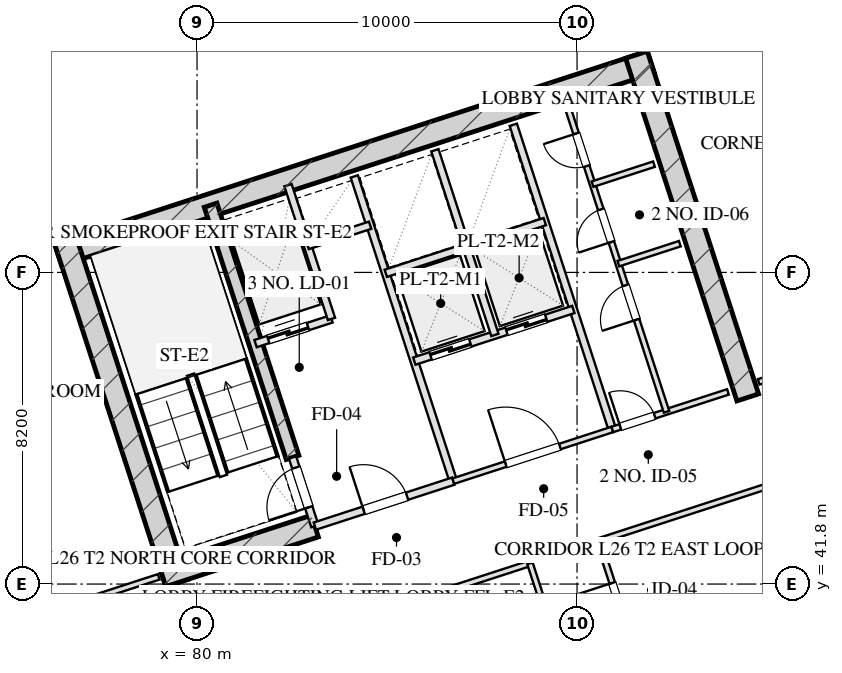
"""IFC4 building model, lengths in metres.
Left out: names, types, materials, properties, quantities, classifications, styles, units other than length and angle.
Written with IfcOpenShell. Run it as: python <this file> out.ifc"""

import sys

from ifc_helpers import new_model, si_unit, direction, frame, frame_2d, origin, place, context, subcontext, project, spatial, rectangle, extrude, element, fill, save


model = new_model("IFC4")
c1 = context("Model", 3, precision=1e-05, world=origin(), true_north=direction((0.0, 1.0)))
c2 = subcontext(c1, "Body", "Model", "MODEL_VIEW")
j1 = project(units=[si_unit("LENGTHUNIT", "METRE"), si_unit("PLANEANGLEUNIT", "RADIAN")], contexts=[c1])
p1 = place(None, origin())
s1 = spatial("IfcSite", under=j1, at=p1, CompositionType="ELEMENT")
p2 = place(p1, origin())
s2 = spatial("IfcBuilding", under=s1, at=p2, CompositionType="ELEMENT")
p3 = place(p2, frame((0.0, 0.0, 103.5)))
s3 = spatial("IfcBuildingStorey", under=s2, at=p3, CompositionType="ELEMENT", Elevation=103.5)
p4 = place(p3, frame((76.344, 50.466, 0.0), z_axis=(0.0, 0.0, 1.0), x_axis=(0.951055727519, 0.309019421968, 0.0)))
e1 = element("IfcWall", 1, at=p4, inside=s3, PredefinedType="SHEAR", context=c2, shape_type="SweptSolid", body=[
    extrude(rectangle(XDim=16.4, YDim=0.6, at=frame_2d((8.2, 0.0))), origin(), (0.0, 0.0, 1.0), 3.45),
])
for number, where, z_axis, x_axis in (
    (2, (79.466, 41.828, 0.0), (0.0, 0.0, 1.0), (-0.309, 0.951, 0.0)),
    (3, (94.492, 46.71, 0.0), (0.0, 0.0, 1.0), (-0.309, 0.951, 0.0)),
):
    element("IfcWall", number, at=place(p3, frame(where, z_axis=z_axis, x_axis=x_axis)), inside=s3, PredefinedType="SHEAR", context=c2, shape_type="SweptSolid", body=[
        extrude(rectangle(XDim=9.48, YDim=0.6, at=frame_2d((4.74, 0.0))), origin(), (0.0, 0.0, 1.0), 3.45),
    ])
p5 = place(p3, frame((82.514, 45.131, 0.0), z_axis=(0.0, 0.0, 1.0), x_axis=(-0.308988790936, 0.951065679686, 0.0)))
e4 = element("IfcWall", 4, at=p5, inside=s3, PredefinedType="SHEAR", context=c2, shape_type="SweptSolid", body=[
    extrude(rectangle(XDim=6.98, YDim=0.35, at=frame_2d((3.49, 0.0))), origin(), (0.0, 0.0, 1.0), 3.45),
])
p6 = place(p3, frame((79.087, 42.021, 0.0), z_axis=(0.0, 0.0, 1.0), x_axis=(0.951062550203, 0.3089984233, 0.0)))
e5 = element("IfcWall", 5, at=p6, inside=s3, PredefinedType="SHEAR", context=c2, shape_type="SweptSolid", body=[
    extrude(rectangle(XDim=4.22, YDim=0.6, at=frame_2d((2.11, 0.0))), origin(), (0.0, 0.0, 1.0), 3.45),
])
p7 = place(p3, frame((80.716, 6.59, 0.0), z_axis=(0.0, 0.0, 1.0), x_axis=(-0.309017542002, 0.95105633836, 0.0)))
e6 = element("IfcWall", 6, at=p7, inside=s3, PredefinedType="SOLIDWALL", context=c2, shape_type="SweptSolid", body=[
    extrude(rectangle(XDim=46.4, YDim=0.4, at=frame_2d((23.2, 0.0))), origin(), (0.0, 0.0, 1.0), 2.61),
])
p8 = place(p7, frame((24.6, 0.0, 0.75)))
e7 = element("IfcOpeningElement", 7, at=p8, cuts=e6, PredefinedType="OPENING", context=c2, shape_type="SweptSolid", body=[
    extrude(rectangle(XDim=2.4, YDim=1.46, at=frame_2d((1.2, 0.73))), frame((0.0, 0.21, 0.0), z_axis=(0.0, -1.0, 0.0), x_axis=(1.0, 0.0, 0.0)), (0.0, 0.0, 1.0), 0.42),
])
p9 = place(p7, frame((28.4, 0.0, 0.75)))
e8 = element("IfcOpeningElement", 8, at=p9, cuts=e6, PredefinedType="OPENING", context=c2, shape_type="SweptSolid", body=[
    extrude(rectangle(XDim=2.4, YDim=1.46, at=frame_2d((1.2, 0.73))), frame((0.0, 0.21, 0.0), z_axis=(0.0, -1.0, 0.0), x_axis=(1.0, 0.0, 0.0)), (0.0, 0.0, 1.0), 0.42),
])
p10 = place(p7, frame((16.77, 0.0, 0.0)))
e9 = element("IfcOpeningElement", 9, at=p10, cuts=e6, PredefinedType="OPENING", context=c2, shape_type="SweptSolid", body=[
    extrude(rectangle(XDim=1.1, YDim=2.15, at=frame_2d((0.55, 1.075))), frame((0.0, 0.21, 0.0), z_axis=(0.0, -1.0, 0.0), x_axis=(1.0, 0.0, 0.0)), (0.0, 0.0, 1.0), 0.42),
])
p11 = place(p3, frame((68.047, 53.995, 0.0), z_axis=(0.0, 0.0, 1.0), x_axis=(0.95105505922, 0.309021478754, 0.0)))
e10 = element("IfcWall", 10, at=p11, inside=s3, PredefinedType="SOLIDWALL", context=c2, shape_type="SweptSolid", body=[
    extrude(rectangle(XDim=29.4, YDim=0.4, at=frame_2d((14.7, 0.0))), origin(), (0.0, 0.0, 1.0), 2.61),
])
p12 = place(p3, frame((83.101, 43.324, 0.0), z_axis=(0.0, 0.0, 1.0), x_axis=(-0.309048298632, 0.951046344356, 0.0)))
e11 = element("IfcWall", 11, at=p12, inside=s3, PredefinedType="PARTITIONING", context=c2, shape_type="SweptSolid", body=[
    extrude(rectangle(XDim=1.9, YDim=0.2, at=frame_2d((0.95, 0.0))), origin(), (0.0, 0.0, 1.0), 3.175),
])
p13 = place(p12, frame((0.52, 0.0, 0.0)))
e12 = element("IfcOpeningElement", 12, at=p13, cuts=e11, PredefinedType="OPENING", context=c2, shape_type="SweptSolid", body=[
    extrude(rectangle(XDim=1.1, YDim=2.05, at=frame_2d((0.55, 1.025))), frame((0.0, 0.11, 0.0), z_axis=(0.0, -1.0, 0.0), x_axis=(1.0, 0.0, 0.0)), (0.0, 0.0, 1.0), 0.22),
])
p14 = place(p3, frame((86.743, 44.508, 0.0), z_axis=(0.0, 0.0, 1.0), x_axis=(-0.309016001439, 0.951056838919, 0.0)))
e13 = element("IfcWall", 13, at=p14, inside=s3, PredefinedType="PARTITIONING", context=c2, shape_type="SweptSolid", body=[
    extrude(rectangle(XDim=8.43, YDim=0.2, at=frame_2d((4.215, 0.0))), origin(), (0.0, 0.0, 1.0), 3.175),
])
p15 = place(p3, frame((83.101, 43.324, 0.0), z_axis=(0.0, 0.0, 1.0), x_axis=(0.951052804469, 0.309028417967, 0.0)))
e14 = element("IfcWall", 14, at=p15, inside=s3, PredefinedType="PARTITIONING", context=c2, shape_type="SweptSolid", body=[
    extrude(rectangle(XDim=3.83, YDim=0.2, at=frame_2d((1.915, 0.0))), origin(), (0.0, 0.0, 1.0), 3.175),
])
p16 = place(p15, frame((1.35, 0.0, 0.0)))
e15 = element("IfcOpeningElement", 15, at=p16, cuts=e14, PredefinedType="OPENING", context=c2, shape_type="SweptSolid", body=[
    extrude(rectangle(XDim=1.2, YDim=2.05, at=frame_2d((0.6, 1.025))), frame((0.0, 0.11, 0.0), z_axis=(0.0, -1.0, 0.0), x_axis=(1.0, 0.0, 0.0)), (0.0, 0.0, 1.0), 0.22),
])
p17 = place(p3, frame((81.54, 48.127, 0.0), z_axis=(0.0, 0.0, 1.0), x_axis=(0.951062257173, 0.308999325213, 0.0)))
e16 = element("IfcWall", 16, at=p17, inside=s3, PredefinedType="PARTITIONING", context=c2, shape_type="SweptSolid", body=[
    extrude(rectangle(XDim=2.1, YDim=0.2, at=frame_2d((1.05, 0.0))), origin(), (0.0, 0.0, 1.0), 3.175),
])
p18 = place(p17, frame((0.35, 0.0, 0.0)))
e17 = element("IfcOpeningElement", 17, at=p18, cuts=e16, PredefinedType="OPENING", context=c2, shape_type="SweptSolid", body=[
    extrude(rectangle(XDim=1.1, YDim=2.05, at=frame_2d((0.55, 1.025))), frame((0.0, 0.11, 0.0), z_axis=(0.0, -1.0, 0.0), x_axis=(1.0, 0.0, 0.0)), (0.0, 0.0, 1.0), 0.22),
])
p19 = place(p3, frame((83.538, 48.776, 0.0), z_axis=(0.0, 0.0, 1.0), x_axis=(-0.3089935693, 0.951064127245, 0.0)))
e18 = element("IfcWall", 18, at=p19, inside=s3, PredefinedType="PARTITIONING", context=c2, shape_type="SweptSolid", body=[
    extrude(rectangle(XDim=3.7, YDim=0.2, at=frame_2d((1.85, 0.0))), origin(), (0.0, 0.0, 1.0), 3.175),
])
p20 = place(p3, frame((82.91, 50.707, 0.0), z_axis=(0.0, 0.0, 1.0), x_axis=(0.951041328149, 0.309063734775, 0.0)))
e19 = element("IfcWall", 19, at=p20, inside=s3, PredefinedType="PARTITIONING", context=c2, shape_type="SweptSolid", body=[
    extrude(rectangle(XDim=1.73, YDim=0.2, at=frame_2d((0.865, 0.0))), origin(), (0.0, 0.0, 1.0), 3.175),
])
p21 = place(p3, frame((90.928, 45.868, 0.0), z_axis=(0.0, 0.0, 1.0), x_axis=(-0.309042196757, 0.951048327176, 0.0)))
e20 = element("IfcWall", 20, at=p21, inside=s3, PredefinedType="PARTITIONING", context=c2, shape_type="SweptSolid", body=[
    extrude(rectangle(XDim=8.43, YDim=0.2, at=frame_2d((4.215, 0.0))), origin(), (0.0, 0.0, 1.0), 3.175),
])
p22 = place(p3, frame((86.743, 44.508, 0.0), z_axis=(0.0, 0.0, 1.0), x_axis=(0.951063829732, 0.308994485023, 0.0)))
e21 = element("IfcWall", 21, at=p22, inside=s3, PredefinedType="PARTITIONING", context=c2, shape_type="SweptSolid", body=[
    extrude(rectangle(XDim=4.4, YDim=0.15, at=frame_2d((2.2, 0.0))), origin(), (0.0, 0.0, 1.0), 3.175),
])
p23 = place(p22, frame((1.45, 0.0, 0.0)))
e22 = element("IfcOpeningElement", 22, at=p23, cuts=e21, PredefinedType="OPENING", context=c2, shape_type="SweptSolid", body=[
    extrude(rectangle(XDim=1.5, YDim=2.05, at=frame_2d((0.75, 1.025))), frame((0.0, 0.085, 0.0), z_axis=(0.0, -1.0, 0.0), x_axis=(1.0, 0.0, 0.0)), (0.0, 0.0, 1.0), 0.17),
])
p24 = place(p3, frame((85.718, 47.666, 0.0), z_axis=(0.0, 0.0, 1.0), x_axis=(0.951058531764, 0.30901079133, 0.0)))
e23 = element("IfcWall", 23, at=p24, inside=s3, PredefinedType="PARTITIONING", context=c2, shape_type="SweptSolid", body=[
    extrude(rectangle(XDim=4.4, YDim=0.2, at=frame_2d((2.2, 0.0))), origin(), (0.0, 0.0, 1.0), 3.175),
])
p25 = place(p24, frame((0.45, 0.0, 0.0)))
e24 = element("IfcOpeningElement", 24, at=p25, cuts=e23, PredefinedType="OPENING", context=c2, shape_type="SweptSolid", body=[
    extrude(rectangle(XDim=1.1, YDim=2.05, at=frame_2d((0.55, 1.025))), frame((0.0, 0.11, 0.0), z_axis=(0.0, -1.0, 0.0), x_axis=(1.0, 0.0, 0.0)), (0.0, 0.0, 1.0), 0.22),
])
p26 = place(p24, frame((2.55, 0.0, 0.0)))
e25 = element("IfcOpeningElement", 25, at=p26, cuts=e23, PredefinedType="OPENING", context=c2, shape_type="SweptSolid", body=[
    extrude(rectangle(XDim=1.1, YDim=2.05, at=frame_2d((0.55, 1.025))), frame((0.0, 0.11, 0.0), z_axis=(0.0, -1.0, 0.0), x_axis=(1.0, 0.0, 0.0)), (0.0, 0.0, 1.0), 0.22),
])
p27 = place(p3, frame((87.838, 48.354, 0.0), z_axis=(0.0, 0.0, 1.0), x_axis=(-0.3090093719, 0.951058992953, 0.0)))
e26 = element("IfcWall", 26, at=p27, inside=s3, PredefinedType="PARTITIONING", context=c2, shape_type="SweptSolid", body=[
    extrude(rectangle(XDim=5.11, YDim=0.2, at=frame_2d((2.555, 0.0))), origin(), (0.0, 0.0, 1.0), 3.175),
])
p28 = place(p3, frame((84.967, 49.977, 0.0), z_axis=(0.0, 0.0, 1.0), x_axis=(0.951063829732, 0.308994485023, 0.0)))
e27 = element("IfcWall", 27, at=p28, inside=s3, PredefinedType="PARTITIONING", context=c2, shape_type="SweptSolid", body=[
    extrude(rectangle(XDim=4.4, YDim=0.2, at=frame_2d((2.2, 0.0))), origin(), (0.0, 0.0, 1.0), 3.175),
])
p29 = place(p3, frame((90.928, 45.868, 0.0), z_axis=(0.0, 0.0, 1.0), x_axis=(0.951059297078, 0.309008435874, 0.0)))
e28 = element("IfcWall", 28, at=p29, inside=s3, PredefinedType="PARTITIONING", context=c2, shape_type="SweptSolid", body=[
    extrude(rectangle(XDim=3.2, YDim=0.15, at=frame_2d((1.6, 0.0))), origin(), (0.0, 0.0, 1.0), 3.175),
])
p30 = place(p29, frame((0.22, 0.0, 0.0)))
e29 = element("IfcOpeningElement", 29, at=p30, cuts=e28, PredefinedType="OPENING", context=c2, shape_type="SweptSolid", body=[
    extrude(rectangle(XDim=0.95, YDim=2.05, at=frame_2d((0.475, 1.025))), frame((0.0, 0.085, 0.0), z_axis=(0.0, -1.0, 0.0), x_axis=(1.0, 0.0, 0.0)), (0.0, 0.0, 1.0), 0.17),
])
p31 = place(p3, frame((92.355, 46.331, 0.0), z_axis=(0.0, 0.0, 1.0), x_axis=(-0.309007490203, 0.951059604335, 0.0)))
e30 = element("IfcWall", 30, at=p31, inside=s3, PredefinedType="PARTITIONING", context=c2, shape_type="SweptSolid", body=[
    extrude(rectangle(XDim=8.43, YDim=0.15, at=frame_2d((4.215, 0.0))), origin(), (0.0, 0.0, 1.0), 3.175),
])
p32 = place(p31, frame((2.55, 0.0, 0.0)))
e31 = element("IfcOpeningElement", 31, at=p32, cuts=e30, PredefinedType="OPENING", context=c2, shape_type="SweptSolid", body=[
    extrude(rectangle(XDim=0.95, YDim=2.05, at=frame_2d((0.475, 1.025))), frame((0.0, 0.085, 0.0), z_axis=(0.0, -1.0, 0.0), x_axis=(1.0, 0.0, 0.0)), (0.0, 0.0, 1.0), 0.17),
])
p33 = place(p31, frame((4.7, 0.0, 0.0)))
e32 = element("IfcOpeningElement", 32, at=p33, cuts=e30, PredefinedType="OPENING", context=c2, shape_type="SweptSolid", body=[
    extrude(rectangle(XDim=0.9, YDim=2.05, at=frame_2d((0.45, 1.025))), frame((0.0, 0.085, 0.0), z_axis=(0.0, -1.0, 0.0), x_axis=(1.0, 0.0, 0.0)), (0.0, 0.0, 1.0), 0.17),
])
p34 = place(p31, frame((6.8, 0.0, 0.0)))
e33 = element("IfcOpeningElement", 33, at=p34, cuts=e30, PredefinedType="OPENING", context=c2, shape_type="SweptSolid", body=[
    extrude(rectangle(XDim=0.9, YDim=2.05, at=frame_2d((0.45, 1.025))), frame((0.0, 0.085, 0.0), z_axis=(0.0, -1.0, 0.0), x_axis=(1.0, 0.0, 0.0)), (0.0, 0.0, 1.0), 0.17),
])
p35 = place(p3, frame((91.088, 50.23, 0.0), z_axis=(0.0, 0.0, 1.0), x_axis=(0.951054116971, 0.309024378638, 0.0)))
e34 = element("IfcWall", 34, at=p35, inside=s3, PredefinedType="PARTITIONING", context=c2, shape_type="SweptSolid", body=[
    extrude(rectangle(XDim=1.7, YDim=0.15, at=frame_2d((0.85, 0.0))), origin(), (0.0, 0.0, 1.0), 3.175),
])
p36 = place(p3, frame((90.408, 52.323, 0.0), z_axis=(0.0, 0.0, 1.0), x_axis=(0.951040401051, 0.309066587596, 0.0)))
e35 = element("IfcWall", 35, at=p36, inside=s3, PredefinedType="PARTITIONING", context=c2, shape_type="SweptSolid", body=[
    extrude(rectangle(XDim=1.7, YDim=0.15, at=frame_2d((0.85, 0.0))), origin(), (0.0, 0.0, 1.0), 3.175),
])
p37 = place(p3, frame((70.338, 39.177, 0.0), z_axis=(0.0, 0.0, 1.0), x_axis=(0.951059695568, 0.309007209409, 0.0)))
e36 = element("IfcWall", 36, at=p37, inside=s3, PredefinedType="PARTITIONING", context=c2, shape_type="SweptSolid", body=[
    extrude(rectangle(XDim=9.1, YDim=0.15, at=frame_2d((4.55, 0.0))), origin(), (0.0, 0.0, 1.0), 3.175),
])
p38 = place(p37, frame((3.822, 0.0, 0.0)))
e37 = element("IfcOpeningElement", 37, at=p38, cuts=e36, PredefinedType="OPENING", context=c2, shape_type="SweptSolid", body=[
    extrude(rectangle(XDim=1.0, YDim=2.05, at=frame_2d((0.5, 1.025))), frame((0.0, 0.085, 0.0), z_axis=(0.0, -1.0, 0.0), x_axis=(1.0, 0.0, 0.0)), (0.0, 0.0, 1.0), 0.17),
])
p39 = place(p3, frame((94.78, 47.119, 0.0), z_axis=(0.0, 0.0, 1.0), x_axis=(0.951054329824, 0.309023723562, 0.0)))
e38 = element("IfcWall", 38, at=p39, inside=s3, PredefinedType="PARTITIONING", context=c2, shape_type="SweptSolid", body=[
    extrude(rectangle(XDim=8.5, YDim=0.15, at=frame_2d((4.25, 0.0))), origin(), (0.0, 0.0, 1.0), 3.175),
])
p40 = place(p39, frame((3.57, 0.0, 0.0)))
e39 = element("IfcOpeningElement", 39, at=p40, cuts=e38, PredefinedType="OPENING", context=c2, shape_type="SweptSolid", body=[
    extrude(rectangle(XDim=1.0, YDim=2.05, at=frame_2d((0.5, 1.025))), frame((0.0, 0.085, 0.0), z_axis=(0.0, -1.0, 0.0), x_axis=(1.0, 0.0, 0.0)), (0.0, 0.0, 1.0), 0.17),
])
p41 = place(p3, frame((80.534, 39.672, 0.0), z_axis=(0.0, 0.0, 1.0), x_axis=(0.951052319652, 0.309029910015, 0.0)))
e40 = element("IfcWall", 40, at=p41, inside=s3, PredefinedType="PARTITIONING", context=c2, shape_type="SweptSolid", body=[
    extrude(rectangle(XDim=8.65, YDim=0.15, at=frame_2d((4.325, 0.0))), origin(), (0.0, 0.0, 1.0), 3.175),
])
p42 = place(p3, frame((90.567, 42.933, 0.0), z_axis=(0.0, 0.0, 1.0), x_axis=(0.951058377365, 0.309011266531, 0.0)))
e41 = element("IfcWall", 41, at=p42, inside=s3, PredefinedType="PARTITIONING", context=c2, shape_type="SweptSolid", body=[
    extrude(rectangle(XDim=13.8, YDim=0.15, at=frame_2d((6.9, 0.0))), origin(), (0.0, 0.0, 1.0), 3.175),
])
p43 = place(p3, frame((93.903, 26.52, 0.0), z_axis=(0.0, 0.0, 1.0), x_axis=(-0.30901773025, 0.951056277195, 0.0)))
e42 = element("IfcWall", 42, at=p43, inside=s3, PredefinedType="PARTITIONING", context=c2, shape_type="SweptSolid", body=[
    extrude(rectangle(XDim=16.64, YDim=0.15, at=frame_2d((8.32, 0.0))), origin(), (0.0, 0.0, 1.0), 3.175),
])
p44 = place(p3, frame((95.709, 27.107, 0.0), z_axis=(0.0, 0.0, 1.0), x_axis=(-0.30901773025, 0.951056277195, 0.0)))
e43 = element("IfcWall", 43, at=p44, inside=s3, PredefinedType="PARTITIONING", context=c2, shape_type="SweptSolid", body=[
    extrude(rectangle(XDim=16.64, YDim=0.15, at=frame_2d((8.32, 0.0))), origin(), (0.0, 0.0, 1.0), 3.175),
])
p45 = place(p44, frame((1.164, 0.0, 0.0)))
e44 = element("IfcOpeningElement", 44, at=p45, cuts=e43, PredefinedType="OPENING", context=c2, shape_type="SweptSolid", body=[
    extrude(rectangle(XDim=1.0, YDim=2.05, at=frame_2d((0.5, 1.025))), frame((0.0, 0.085, 0.0), z_axis=(0.0, -1.0, 0.0), x_axis=(1.0, 0.0, 0.0)), (0.0, 0.0, 1.0), 0.17),
])
p46 = place(p44, frame((4.724, 0.0, 0.0)))
e45 = element("IfcOpeningElement", 45, at=p46, cuts=e43, PredefinedType="OPENING", context=c2, shape_type="SweptSolid", body=[
    extrude(rectangle(XDim=1.0, YDim=2.05, at=frame_2d((0.5, 1.025))), frame((0.0, 0.085, 0.0), z_axis=(0.0, -1.0, 0.0), x_axis=(1.0, 0.0, 0.0)), (0.0, 0.0, 1.0), 0.17),
])
p47 = place(p44, frame((7.82, 0.0, 0.0)))
e46 = element("IfcOpeningElement", 46, at=p47, cuts=e43, PredefinedType="OPENING", context=c2, shape_type="SweptSolid", body=[
    extrude(rectangle(XDim=1.05, YDim=2.05, at=frame_2d((0.525, 1.025))), frame((0.0, 0.085, 0.0), z_axis=(0.0, -1.0, 0.0), x_axis=(1.0, 0.0, 0.0)), (0.0, 0.0, 1.0), 0.17),
])
p48 = place(p44, frame((10.92, 0.0, 0.0)))
e47 = element("IfcOpeningElement", 47, at=p48, cuts=e43, PredefinedType="OPENING", context=c2, shape_type="SweptSolid", body=[
    extrude(rectangle(XDim=1.0, YDim=2.05, at=frame_2d((0.5, 1.025))), frame((0.0, 0.085, 0.0), z_axis=(0.0, -1.0, 0.0), x_axis=(1.0, 0.0, 0.0)), (0.0, 0.0, 1.0), 0.17),
])
p49 = place(p44, frame((14.48, 0.0, 0.0)))
e48 = element("IfcOpeningElement", 48, at=p49, cuts=e43, PredefinedType="OPENING", context=c2, shape_type="SweptSolid", body=[
    extrude(rectangle(XDim=1.0, YDim=2.05, at=frame_2d((0.5, 1.025))), frame((0.0, 0.085, 0.0), z_axis=(0.0, -1.0, 0.0), x_axis=(1.0, 0.0, 0.0)), (0.0, 0.0, 1.0), 0.17),
])
p50 = place(p3, frame((91.594, 39.775, 0.0), z_axis=(0.0, 0.0, 1.0), x_axis=(0.951056688031, 0.309016465825, 0.0)))
e49 = element("IfcWall", 49, at=p50, inside=s3, PredefinedType="PARTITIONING", context=c2, shape_type="SweptSolid", body=[
    extrude(rectangle(XDim=13.8, YDim=0.15, at=frame_2d((6.9, 0.0))), origin(), (0.0, 0.0, 1.0), 3.175),
])
p51 = place(p13, origin())
e50 = element("IfcDoor", 50, at=p51, inside=s3, OperationType="SINGLE_SWING_LEFT", PredefinedType="DOOR", context=c2, shape_type="SweptSolid", body=[
    extrude(rectangle(XDim=1.1, YDim=2.05, at=frame_2d((0.55, 1.025))), frame((0.0, 0.025, 0.0), z_axis=(0.0, -1.0, 0.0), x_axis=(1.0, 0.0, 0.0)), (0.0, 0.0, 1.0), 0.05),
])
fill(e12, e50)
p52 = place(p16, origin())
e51 = element("IfcDoor", 51, at=p52, inside=s3, OperationType="SINGLE_SWING_LEFT", PredefinedType="DOOR", context=c2, shape_type="SweptSolid", body=[
    extrude(rectangle(XDim=1.2, YDim=2.05, at=frame_2d((0.6, 1.025))), frame((0.0, 0.025, 0.0), z_axis=(0.0, -1.0, 0.0), x_axis=(1.0, 0.0, 0.0)), (0.0, 0.0, 1.0), 0.05),
])
fill(e15, e51)
p53 = place(p18, origin())
e52 = element("IfcDoor", 52, at=p53, inside=s3, OperationType="DOUBLE_DOOR_SLIDING", PredefinedType="DOOR", context=c2, shape_type="SweptSolid", body=[
    extrude(rectangle(XDim=1.1, YDim=2.05, at=frame_2d((0.55, 1.025))), frame((0.0, 0.025, 0.0), z_axis=(0.0, -1.0, 0.0), x_axis=(1.0, 0.0, 0.0)), (0.0, 0.0, 1.0), 0.05),
])
fill(e17, e52)
p54 = place(p23, origin())
e53 = element("IfcDoor", 53, at=p54, inside=s3, OperationType="SINGLE_SWING_LEFT", PredefinedType="DOOR", context=c2, shape_type="SweptSolid", body=[
    extrude(rectangle(XDim=1.5, YDim=2.05, at=frame_2d((0.75, 1.025))), frame((0.0, 0.025, 0.0), z_axis=(0.0, -1.0, 0.0), x_axis=(1.0, 0.0, 0.0)), (0.0, 0.0, 1.0), 0.05),
])
fill(e22, e53)
p55 = place(p25, origin())
e54 = element("IfcDoor", 54, at=p55, inside=s3, OperationType="DOUBLE_DOOR_SLIDING", PredefinedType="DOOR", context=c2, shape_type="SweptSolid", body=[
    extrude(rectangle(XDim=1.1, YDim=2.05, at=frame_2d((0.55, 1.025))), frame((0.0, 0.025, 0.0), z_axis=(0.0, -1.0, 0.0), x_axis=(1.0, 0.0, 0.0)), (0.0, 0.0, 1.0), 0.05),
])
fill(e24, e54)
p56 = place(p26, origin())
e55 = element("IfcDoor", 55, at=p56, inside=s3, OperationType="DOUBLE_DOOR_SLIDING", PredefinedType="DOOR", context=c2, shape_type="SweptSolid", body=[
    extrude(rectangle(XDim=1.1, YDim=2.05, at=frame_2d((0.55, 1.025))), frame((0.0, 0.025, 0.0), z_axis=(0.0, -1.0, 0.0), x_axis=(1.0, 0.0, 0.0)), (0.0, 0.0, 1.0), 0.05),
])
fill(e25, e55)
p57 = place(p30, origin())
e56 = element("IfcDoor", 56, at=p57, inside=s3, OperationType="SINGLE_SWING_LEFT", PredefinedType="DOOR", context=c2, shape_type="SweptSolid", body=[
    extrude(rectangle(XDim=0.95, YDim=2.05, at=frame_2d((0.475, 1.025))), frame((0.0, 0.025, 0.0), z_axis=(0.0, -1.0, 0.0), x_axis=(1.0, 0.0, 0.0)), (0.0, 0.0, 1.0), 0.05),
])
fill(e29, e56)
p58 = place(p32, origin())
e57 = element("IfcDoor", 57, at=p58, inside=s3, OperationType="SINGLE_SWING_LEFT", PredefinedType="DOOR", context=c2, shape_type="SweptSolid", body=[
    extrude(rectangle(XDim=0.95, YDim=2.05, at=frame_2d((0.475, 1.025))), frame((0.0, 0.025, 0.0), z_axis=(0.0, -1.0, 0.0), x_axis=(1.0, 0.0, 0.0)), (0.0, 0.0, 1.0), 0.05),
])
fill(e31, e57)
p59 = place(p33, origin())
e58 = element("IfcDoor", 58, at=p59, inside=s3, OperationType="SINGLE_SWING_LEFT", PredefinedType="DOOR", context=c2, shape_type="SweptSolid", body=[
    extrude(rectangle(XDim=0.9, YDim=2.05, at=frame_2d((0.45, 1.025))), frame((0.0, 0.025, 0.0), z_axis=(0.0, -1.0, 0.0), x_axis=(1.0, 0.0, 0.0)), (0.0, 0.0, 1.0), 0.05),
])
fill(e32, e58)
p60 = place(p34, origin())
e59 = element("IfcDoor", 59, at=p60, inside=s3, OperationType="SINGLE_SWING_RIGHT", PredefinedType="DOOR", context=c2, shape_type="SweptSolid", body=[
    extrude(rectangle(XDim=0.9, YDim=2.05, at=frame_2d((0.45, 1.025))), frame((0.0, 0.025, 0.0), z_axis=(0.0, -1.0, 0.0), x_axis=(1.0, 0.0, 0.0)), (0.0, 0.0, 1.0), 0.05),
])
fill(e33, e59)
p61 = place(p49, origin())
e60 = element("IfcDoor", 60, at=p61, inside=s3, OperationType="SINGLE_SWING_RIGHT", PredefinedType="DOOR", context=c2, shape_type="SweptSolid", body=[
    extrude(rectangle(XDim=1.0, YDim=2.05, at=frame_2d((0.5, 1.025))), frame((0.0, 0.025, 0.0), z_axis=(0.0, -1.0, 0.0), x_axis=(1.0, 0.0, 0.0)), (0.0, 0.0, 1.0), 0.05),
])
fill(e48, e60)
save(model, sys.argv[1])
